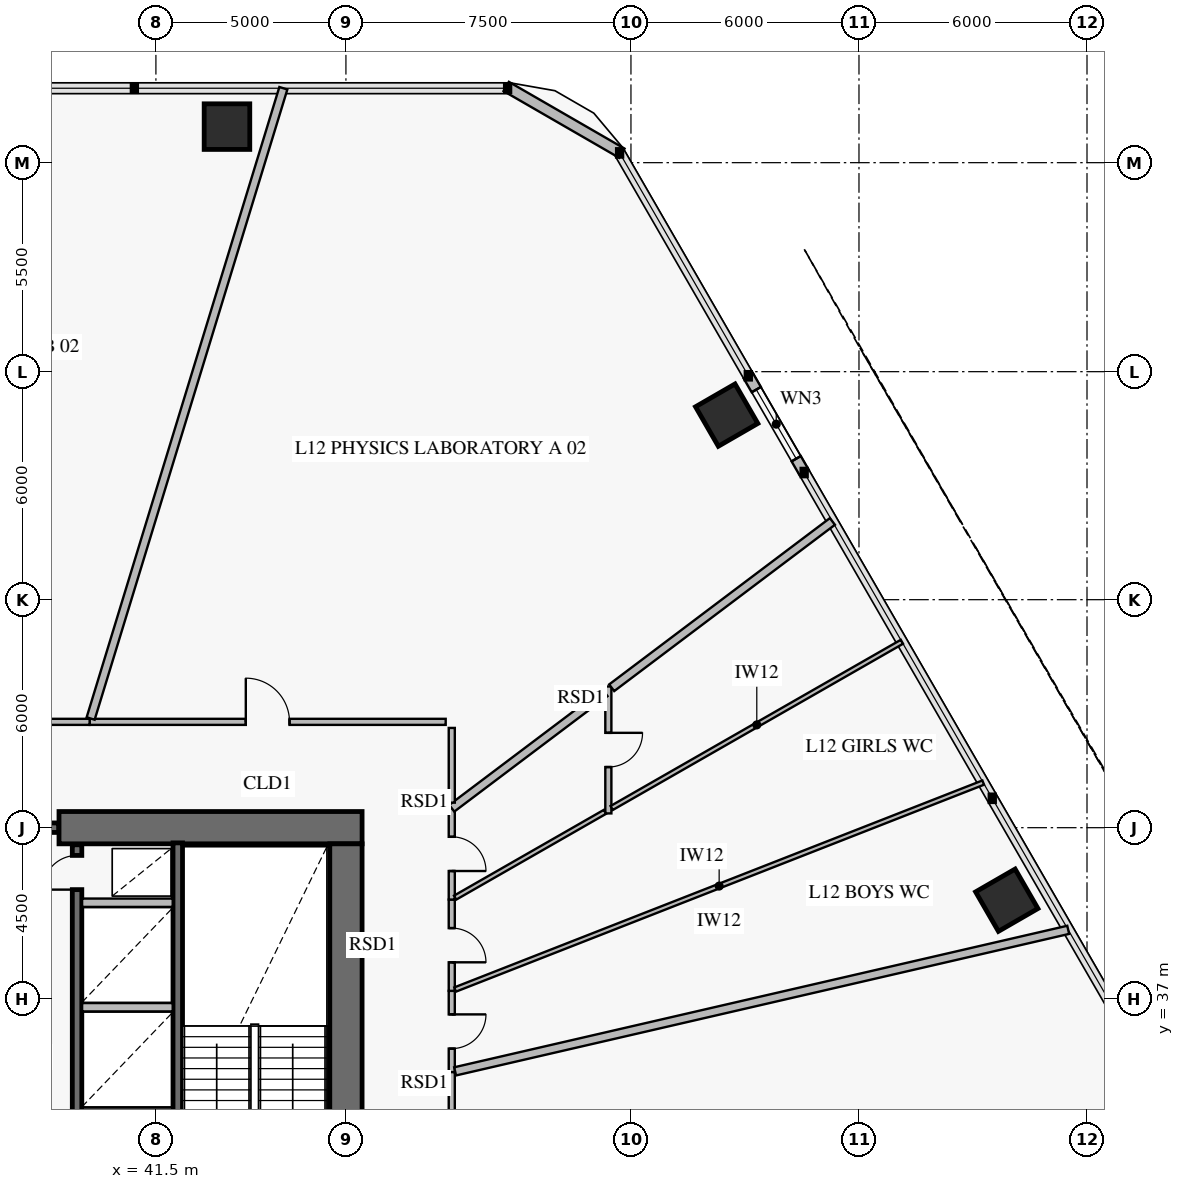
"""IFC4 building model, lengths in metres.
Left out: names, types, materials, properties, quantities, classifications, styles, units other than length and angle.
Written with IfcOpenShell. Run it as: python <this file> out.ifc"""

import sys

from ifc_helpers import new_model, si_unit, direction, frame, frame_2d, origin, origin_2d, place, context, subcontext, project, spatial, rectangle, extrude, element, fill, save


model = new_model("IFC4")
c1 = context("Model", 3, precision=1e-05, world=origin(), true_north=direction((0.0, 1.0)))
c2 = subcontext(c1, "Body", "Model", "MODEL_VIEW")
j1 = project(units=[si_unit("LENGTHUNIT", "METRE"), si_unit("PLANEANGLEUNIT", "RADIAN")], contexts=[c1])
p1 = place(None, origin())
s1 = spatial("IfcSite", under=j1, at=p1, CompositionType="ELEMENT")
p2 = place(p1, origin())
s2 = spatial("IfcBuilding", under=s1, at=p2, CompositionType="ELEMENT")
p3 = place(p2, frame((0.0, 0.0, 49.8)))
s3 = spatial("IfcBuildingStorey", under=s2, at=p3, CompositionType="ELEMENT", Elevation=49.8)
p4 = place(p3, frame((46.925, 41.5, 0.0), z_axis=(0.0, 0.0, 1.0), x_axis=(-1.0, 0.0, 0.0)))
e1 = element("IfcWall", 1, at=p4, inside=s3, PredefinedType="SHEAR", context=c2, shape_type="SweptSolid", body=[
    extrude(rectangle(XDim=7.975, YDim=0.85, at=frame_2d((3.988, 0.0))), origin(), (0.0, 0.0, 1.0), 4.2),
])
p5 = place(p3, frame((46.5, 22.925, 0.0), z_axis=(0.0, 0.0, 1.0), x_axis=(0.0, 1.0, 0.0)))
e2 = element("IfcWall", 2, at=p5, inside=s3, PredefinedType="SHEAR", context=c2, shape_type="SweptSolid", body=[
    extrude(rectangle(XDim=18.15, YDim=0.85, at=frame_2d((9.075, 0.0))), origin(), (0.0, 0.0, 1.0), 4.2),
])
p6 = place(p5, frame((8.825, 0.0, 0.0)))
e3 = element("IfcOpeningElement", 3, at=p6, cuts=e2, PredefinedType="OPENING", context=c2, shape_type="SweptSolid", body=[
    extrude(rectangle(XDim=1.1, YDim=2.15, at=frame_2d((0.55, 1.075))), frame((0.0, 0.437, 0.0), z_axis=(0.0, -1.0, 0.0), x_axis=(1.0, 0.0, 0.0)), (0.0, 0.0, 1.0), 0.874),
])
for number, where, z_axis, x_axis in (
    (4, (63.889, 39.592, 0.0), (0.0, 0.0, 1.0), (-0.5, 0.866, 0.0)),
    (5, (56.519, 52.357, 0.0), (0.0, 0.0, 1.0), (-0.5, 0.866, 0.0)),
    (6, (43.37, 59.948, 0.0), (0.0, 0.0, 1.0), (-1.0, 0.0, 0.0)),
):
    element("IfcColumn", number, at=place(p3, frame(where, z_axis=z_axis, x_axis=x_axis)), inside=s3, PredefinedType="COLUMN", context=c2, shape_type="SweptSolid", body=[
        extrude(rectangle(XDim=1.2, YDim=1.2, at=origin_2d()), origin(), (0.0, 0.0, 1.0), 3.92),
    ])
p7 = place(p3, frame((50.717, 61.006, 0.0), z_axis=(0.0, 0.0, 1.0), x_axis=(0.866007452331, -0.500031091541, 0.0)))
e7 = element("IfcWall", 7, at=p7, inside=s3, PredefinedType="SOLIDWALL", context=c2, shape_type="SweptSolid", body=[
    extrude(rectangle(XDim=3.515, YDim=0.28, at=frame_2d((1.757, 0.0))), origin(), (0.0, 0.0, 1.0), 3.92),
])
p8 = place(p3, frame((57.088, 53.392, 0.0), z_axis=(0.0, 0.0, 1.0), x_axis=(0.500024377727, -0.866011328839, 0.0)))
e8 = element("IfcWall", 8, at=p8, inside=s3, PredefinedType="SOLIDWALL", context=c2, shape_type="SweptSolid", body=[
    extrude(rectangle(XDim=2.94, YDim=0.28, at=frame_2d((1.47, 0.0))), origin(), (0.0, 0.0, 1.0), 3.92),
])
p9 = place(p8, frame((0.42, 0.0, 0.7)))
e9 = element("IfcOpeningElement", 9, at=p9, cuts=e8, PredefinedType="OPENING", context=c2, shape_type="SweptSolid", body=[
    extrude(rectangle(XDim=2.1, YDim=1.5, at=frame_2d((1.05, 0.75))), frame((0.0, 0.152, 0.0), z_axis=(0.0, -1.0, 0.0), x_axis=(1.0, 0.0, 0.0)), (0.0, 0.0, 1.0), 0.304),
])
p10 = place(p3, frame((36.76, 41.5, 0.0), z_axis=(0.0, 0.0, 1.0), x_axis=(1.0, 0.0, 0.0)))
e10 = element("IfcWall", 10, at=p10, inside=s3, PredefinedType="SOLIDWALL", context=c2, shape_type="SweptSolid", body=[
    extrude(rectangle(XDim=2.18, YDim=0.25, at=frame_2d((1.09, 0.0))), origin(), (0.0, 0.0, 1.0), 4.2),
])
p11 = place(p10, frame((0.34, 0.0, 0.0)))
e11 = element("IfcOpeningElement", 11, at=p11, cuts=e10, PredefinedType="OPENING", context=c2, shape_type="SweptSolid", body=[
    extrude(rectangle(XDim=1.5, YDim=2.15, at=frame_2d((0.75, 1.075))), frame((0.0, 0.137, 0.0), z_axis=(0.0, -1.0, 0.0), x_axis=(1.0, 0.0, 0.0)), (0.0, 0.0, 1.0), 0.274),
])
p12 = place(p3, frame((42.075, 31.4, 0.0), z_axis=(0.0, 0.0, 1.0), x_axis=(0.0, 1.0, 0.0)))
e12 = element("IfcWall", 12, at=p12, inside=s3, PredefinedType="SOLIDWALL", context=c2, shape_type="SweptSolid", body=[
    extrude(rectangle(XDim=9.7, YDim=0.25, at=frame_2d((4.85, 0.0))), origin(), (0.0, 0.0, 1.0), 4.2),
])
p13 = place(p3, frame((39.425, 31.4, 0.0), z_axis=(0.0, 0.0, 1.0), x_axis=(0.0, 1.0, 0.0)))
e13 = element("IfcWall", 13, at=p13, inside=s3, PredefinedType="SOLIDWALL", context=c2, shape_type="SweptSolid", body=[
    extrude(rectangle(XDim=9.65, YDim=0.25, at=frame_2d((4.825, 0.0))), origin(), (0.0, 0.0, 1.0), 4.2),
])
p14 = place(p13, frame((8.47, 0.0, 0.0)))
e14 = element("IfcOpeningElement", 14, at=p14, cuts=e13, PredefinedType="OPENING", context=c2, shape_type="SweptSolid", body=[
    extrude(rectangle(XDim=0.9, YDim=2.1, at=frame_2d((0.45, 1.05))), frame((0.0, 0.137, 0.0), z_axis=(0.0, -1.0, 0.0), x_axis=(1.0, 0.0, 0.0)), (0.0, 0.0, 1.0), 0.274),
])
p15 = place(p3, frame((49.285, 35.067, 0.0), z_axis=(0.0, 0.0, 1.0), x_axis=(0.0, 1.0, 0.0)))
e15 = element("IfcWall", 15, at=p15, inside=s3, PredefinedType="PARTITIONING", context=c2, shape_type="SweptSolid", body=[
    extrude(rectangle(XDim=2.139, YDim=0.16, at=frame_2d((1.07, 0.0))), origin(), (0.0, 0.0, 1.0), 3.22),
])
p16 = place(p15, frame((0.62, 0.0, 0.0)))
e16 = element("IfcOpeningElement", 16, at=p16, cuts=e15, PredefinedType="OPENING", context=c2, shape_type="SweptSolid", body=[
    extrude(rectangle(XDim=0.9, YDim=2.1, at=frame_2d((0.45, 1.05))), frame((0.0, 0.092, 0.0), z_axis=(0.0, -1.0, 0.0), x_axis=(1.0, 0.0, 0.0)), (0.0, 0.0, 1.0), 0.184),
])
p17 = place(p3, frame((49.285, 37.206, 0.0), z_axis=(0.0, 0.0, 1.0), x_axis=(0.0, 1.0, 0.0)))
e17 = element("IfcWall", 17, at=p17, inside=s3, PredefinedType="PARTITIONING", context=c2, shape_type="SweptSolid", body=[
    extrude(rectangle(XDim=2.402, YDim=0.16, at=frame_2d((1.201, 0.0))), origin(), (0.0, 0.0, 1.0), 3.92),
])
p18 = place(p17, frame((0.751, 0.0, 0.0)))
e18 = element("IfcOpeningElement", 18, at=p18, cuts=e17, PredefinedType="OPENING", context=c2, shape_type="SweptSolid", body=[
    extrude(rectangle(XDim=0.9, YDim=2.1, at=frame_2d((0.45, 1.05))), frame((0.0, 0.092, 0.0), z_axis=(0.0, -1.0, 0.0), x_axis=(1.0, 0.0, 0.0)), (0.0, 0.0, 1.0), 0.184),
])
p19 = place(p3, frame((53.405, 45.216, 0.0), z_axis=(0.0, 0.0, 1.0), x_axis=(0.0, -1.0, 0.0)))
e19 = element("IfcWall", 19, at=p19, inside=s3, PredefinedType="PARTITIONING", context=c2, shape_type="SweptSolid", body=[
    extrude(rectangle(XDim=3.34, YDim=0.16, at=frame_2d((1.67, 0.0))), origin(), (0.0, 0.0, 1.0), 3.47),
])
p20 = place(p19, frame((1.22, 0.0, 0.0)))
e20 = element("IfcOpeningElement", 20, at=p20, cuts=e19, PredefinedType="OPENING", context=c2, shape_type="SweptSolid", body=[
    extrude(rectangle(XDim=0.9, YDim=2.1, at=frame_2d((0.45, 1.05))), frame((0.0, 0.092, 0.0), z_axis=(0.0, -1.0, 0.0), x_axis=(1.0, 0.0, 0.0)), (0.0, 0.0, 1.0), 0.184),
])
p21 = place(p3, frame((49.285, 39.608, 0.0), z_axis=(0.0, 0.0, 1.0), x_axis=(0.0, 1.0, 0.0)))
e21 = element("IfcWall", 21, at=p21, inside=s3, PredefinedType="PARTITIONING", context=c2, shape_type="SweptSolid", body=[
    extrude(rectangle(XDim=2.403, YDim=0.16, at=frame_2d((1.201, 0.0))), origin(), (0.0, 0.0, 1.0), 3.92),
])
p22 = place(p21, frame((0.751, 0.0, 0.0)))
e22 = element("IfcOpeningElement", 22, at=p22, cuts=e21, PredefinedType="OPENING", context=c2, shape_type="SweptSolid", body=[
    extrude(rectangle(XDim=0.9, YDim=2.1, at=frame_2d((0.45, 1.05))), frame((0.0, 0.092, 0.0), z_axis=(0.0, -1.0, 0.0), x_axis=(1.0, 0.0, 0.0)), (0.0, 0.0, 1.0), 0.184),
])
p23 = place(p3, frame((49.125, 44.285, 0.0), z_axis=(0.0, 0.0, 1.0), x_axis=(-1.0, 0.0, 0.0)))
e23 = element("IfcWall", 23, at=p23, inside=s3, PredefinedType="PARTITIONING", context=c2, shape_type="SweptSolid", body=[
    extrude(rectangle(XDim=9.369, YDim=0.16, at=frame_2d((4.685, 0.0))), origin(), (0.0, 0.0, 1.0), 3.22),
])
p24 = place(p23, frame((4.11, 0.0, 0.0)))
e24 = element("IfcOpeningElement", 24, at=p24, cuts=e23, PredefinedType="OPENING", context=c2, shape_type="SweptSolid", body=[
    extrude(rectangle(XDim=1.15, YDim=2.2, at=frame_2d((0.575, 1.1))), frame((0.0, 0.092, 0.0), z_axis=(0.0, -1.0, 0.0), x_axis=(1.0, 0.0, 0.0)), (0.0, 0.0, 1.0), 0.184),
])
p25 = place(p3, frame((39.756, 44.285, 0.0), z_axis=(0.0, 0.0, 1.0), x_axis=(-1.0, 0.0, 0.0)))
e25 = element("IfcWall", 25, at=p25, inside=s3, PredefinedType="PARTITIONING", context=c2, shape_type="SweptSolid", body=[
    extrude(rectangle(XDim=7.986, YDim=0.16, at=frame_2d((3.993, 0.0))), origin(), (0.0, 0.0, 1.0), 3.22),
])
p26 = place(p25, frame((3.418, 0.0, 0.0)))
e26 = element("IfcOpeningElement", 26, at=p26, cuts=e25, PredefinedType="OPENING", context=c2, shape_type="SweptSolid", body=[
    extrude(rectangle(XDim=1.15, YDim=2.2, at=frame_2d((0.575, 1.1))), frame((0.0, 0.092, 0.0), z_axis=(0.0, -1.0, 0.0), x_axis=(1.0, 0.0, 0.0)), (0.0, 0.0, 1.0), 0.184),
])
p27 = place(p3, frame((49.285, 21.989, 0.0), z_axis=(0.0, 0.0, 1.0), x_axis=(0.0, 1.0, 0.0)))
e27 = element("IfcWall", 27, at=p27, inside=s3, PredefinedType="PARTITIONING", context=c2, shape_type="SweptSolid", body=[
    extrude(rectangle(XDim=13.078, YDim=0.16, at=frame_2d((6.539, 0.0))), origin(), (0.0, 0.0, 1.0), 3.22),
])
p28 = place(p27, frame((6.064, 0.0, 0.0)))
e28 = element("IfcOpeningElement", 28, at=p28, cuts=e27, PredefinedType="OPENING", context=c2, shape_type="SweptSolid", body=[
    extrude(rectangle(XDim=0.95, YDim=2.1, at=frame_2d((0.475, 1.05))), frame((0.0, 0.092, 0.0), z_axis=(0.0, -1.0, 0.0), x_axis=(1.0, 0.0, 0.0)), (0.0, 0.0, 1.0), 0.184),
])
for number, where, z_axis, x_axis in (
    (29, (39.558, 34.025, 0.0), (0.0, 0.0, 1.0), (1.0, 0.0, 0.0)),
    (30, (39.558, 36.775, 0.0), (0.0, 0.0, 1.0), (1.0, 0.0, 0.0)),
    (31, (39.558, 39.525, 0.0), (0.0, 0.0, 1.0), (1.0, 0.0, 0.0)),
):
    element("IfcWall", number, at=place(p3, frame(where, z_axis=z_axis, x_axis=x_axis)), inside=s3, PredefinedType="PARTITIONING", context=c2, shape_type="SweptSolid", body=[
        extrude(rectangle(XDim=2.384, YDim=0.22, at=frame_2d((1.192, 0.0))), origin(), (0.0, 0.0, 1.0), 3.92),
    ])
p29 = place(p3, frame((49.373, 35.087, 0.0), z_axis=(0.0, 0.0, 1.0), x_axis=(0.974368575461, 0.224957505217, 0.0)))
e32 = element("IfcWall", 32, at=p29, inside=s3, PredefinedType="PARTITIONING", context=c2, shape_type="SweptSolid", body=[
    extrude(rectangle(XDim=16.557, YDim=0.22, at=frame_2d((8.278, 0.0))), origin(), (0.0, 0.0, 1.0), 3.17),
])
p30 = place(p3, frame((49.373, 37.241, 0.0), z_axis=(0.0, 0.0, 1.0), x_axis=(0.931056574404, 0.364874848761, 0.0)))
e33 = element("IfcWall", 33, at=p30, inside=s3, PredefinedType="PARTITIONING", context=c2, shape_type="SweptSolid", body=[
    extrude(rectangle(XDim=14.925, YDim=0.12, at=frame_2d((7.462, 0.0))), origin(), (0.0, 0.0, 1.0), 3.17),
])
p31 = place(p3, frame((49.373, 39.659, 0.0), z_axis=(0.0, 0.0, 1.0), x_axis=(0.867753476972, 0.496994872412, 0.0)))
e34 = element("IfcWall", 34, at=p31, inside=s3, PredefinedType="PARTITIONING", context=c2, shape_type="SweptSolid", body=[
    extrude(rectangle(XDim=4.545, YDim=0.12, at=frame_2d((2.272, 0.0))), origin(), (0.0, 0.0, 1.0), 3.92),
])
p32 = place(p3, frame((53.493, 42.018, 0.0), z_axis=(0.0, 0.0, 1.0), x_axis=(0.867773256473, 0.496960335791, 0.0)))
e35 = element("IfcWall", 35, at=p32, inside=s3, PredefinedType="PARTITIONING", context=c2, shape_type="SweptSolid", body=[
    extrude(rectangle(XDim=8.8, YDim=0.12, at=frame_2d((4.4, 0.0))), origin(), (0.0, 0.0, 1.0), 3.17),
])
p33 = place(p3, frame((49.285, 42.011, 0.0), z_axis=(0.0, 0.0, 1.0), x_axis=(0.798634234908, 0.601816715315, 0.0)))
e36 = element("IfcWall", 36, at=p33, inside=s3, PredefinedType="PARTITIONING", context=c2, shape_type="SweptSolid", body=[
    extrude(rectangle(XDim=5.049, YDim=0.22, at=frame_2d((2.524, 0.0))), origin(), (0.0, 0.0, 1.0), 3.47),
])
p34 = place(p3, frame((53.493, 45.182, 0.0), z_axis=(0.0, 0.0, 1.0), x_axis=(0.798624171574, 0.60183006952, 0.0)))
e37 = element("IfcWall", 37, at=p34, inside=s3, PredefinedType="PARTITIONING", context=c2, shape_type="SweptSolid", body=[
    extrude(rectangle(XDim=7.272, YDim=0.22, at=frame_2d((3.636, 0.0))), origin(), (0.0, 0.0, 1.0), 3.17),
])
p35 = place(p3, frame((39.783, 44.373, 0.0), z_axis=(0.0, 0.0, 1.0), x_axis=(0.29237803707, 0.956302819947, 0.0)))
e38 = element("IfcWall", 38, at=p35, inside=s3, PredefinedType="PARTITIONING", context=c2, shape_type="SweptSolid", body=[
    extrude(rectangle(XDim=17.343, YDim=0.22, at=frame_2d((8.672, 0.0))), origin(), (0.0, 0.0, 1.0), 3.17),
])
p36 = place(p3, frame((49.285, 42.159, 0.0), z_axis=(0.0, 0.0, 1.0), x_axis=(0.0, 1.0, 0.0)))
e39 = element("IfcWall", 39, at=p36, inside=s3, PredefinedType="PARTITIONING", context=c2, shape_type="SweptSolid", body=[
    extrude(rectangle(XDim=1.966, YDim=0.16, at=frame_2d((0.983, 0.0))), origin(), (0.0, 0.0, 1.0), 3.92),
])
p37 = place(p9, origin())
e40 = element("IfcWindow", 40, at=p37, inside=s3, PartitioningType="SINGLE_PANEL", PredefinedType="WINDOW", context=c2, shape_type="SweptSolid", body=[
    extrude(rectangle(XDim=2.1, YDim=1.5, at=frame_2d((1.05, 0.75))), frame((0.0, 0.03, 0.0), z_axis=(0.0, -1.0, 0.0), x_axis=(1.0, 0.0, 0.0)), (0.0, 0.0, 1.0), 0.06),
])
fill(e9, e40)
p38 = place(p14, origin())
e41 = element("IfcDoor", 41, at=p38, inside=s3, OperationType="SINGLE_SWING_LEFT", PredefinedType="DOOR", context=c2, shape_type="SweptSolid", body=[
    extrude(rectangle(XDim=0.9, YDim=2.1, at=frame_2d((0.45, 1.05))), frame((0.0, 0.025, 0.0), z_axis=(0.0, -1.0, 0.0), x_axis=(1.0, 0.0, 0.0)), (0.0, 0.0, 1.0), 0.05),
])
fill(e14, e41)
p39 = place(p16, frame((0.9, 0.0, 0.0), z_axis=(0.0, 0.0, 1.0), x_axis=(-1.0, 0.0, 0.0)))
e42 = element("IfcDoor", 42, at=p39, inside=s3, OperationType="SINGLE_SWING_LEFT", PredefinedType="DOOR", context=c2, shape_type="SweptSolid", body=[
    extrude(rectangle(XDim=0.9, YDim=2.1, at=frame_2d((0.45, 1.05))), frame((0.0, 0.025, 0.0), z_axis=(0.0, -1.0, 0.0), x_axis=(1.0, 0.0, 0.0)), (0.0, 0.0, 1.0), 0.05),
])
fill(e16, e42)
p40 = place(p18, frame((0.9, 0.0, 0.0), z_axis=(0.0, 0.0, 1.0), x_axis=(-1.0, 0.0, 0.0)))
e43 = element("IfcDoor", 43, at=p40, inside=s3, OperationType="SINGLE_SWING_RIGHT", PredefinedType="DOOR", context=c2, shape_type="SweptSolid", body=[
    extrude(rectangle(XDim=0.9, YDim=2.1, at=frame_2d((0.45, 1.05))), frame((0.0, 0.025, 0.0), z_axis=(0.0, -1.0, 0.0), x_axis=(1.0, 0.0, 0.0)), (0.0, 0.0, 1.0), 0.05),
])
fill(e18, e43)
p41 = place(p20, origin())
e44 = element("IfcDoor", 44, at=p41, inside=s3, OperationType="SINGLE_SWING_LEFT", PredefinedType="DOOR", context=c2, shape_type="SweptSolid", body=[
    extrude(rectangle(XDim=0.9, YDim=2.1, at=frame_2d((0.45, 1.05))), frame((0.0, 0.025, 0.0), z_axis=(0.0, -1.0, 0.0), x_axis=(1.0, 0.0, 0.0)), (0.0, 0.0, 1.0), 0.05),
])
fill(e20, e44)
p42 = place(p22, frame((0.9, 0.0, 0.0), z_axis=(0.0, 0.0, 1.0), x_axis=(-1.0, 0.0, 0.0)))
e45 = element("IfcDoor", 45, at=p42, inside=s3, OperationType="SINGLE_SWING_RIGHT", PredefinedType="DOOR", context=c2, shape_type="SweptSolid", body=[
    extrude(rectangle(XDim=0.9, YDim=2.1, at=frame_2d((0.45, 1.05))), frame((0.0, 0.025, 0.0), z_axis=(0.0, -1.0, 0.0), x_axis=(1.0, 0.0, 0.0)), (0.0, 0.0, 1.0), 0.05),
])
fill(e22, e45)
p43 = place(p24, frame((1.15, 0.0, 0.0), z_axis=(0.0, 0.0, 1.0), x_axis=(-1.0, 0.0, 0.0)))
e46 = element("IfcDoor", 46, at=p43, inside=s3, OperationType="SINGLE_SWING_LEFT", PredefinedType="DOOR", context=c2, shape_type="SweptSolid", body=[
    extrude(rectangle(XDim=1.15, YDim=2.2, at=frame_2d((0.575, 1.1))), frame((0.0, 0.025, 0.0), z_axis=(0.0, -1.0, 0.0), x_axis=(1.0, 0.0, 0.0)), (0.0, 0.0, 1.0), 0.05),
])
fill(e24, e46)
save(model, sys.argv[1])
